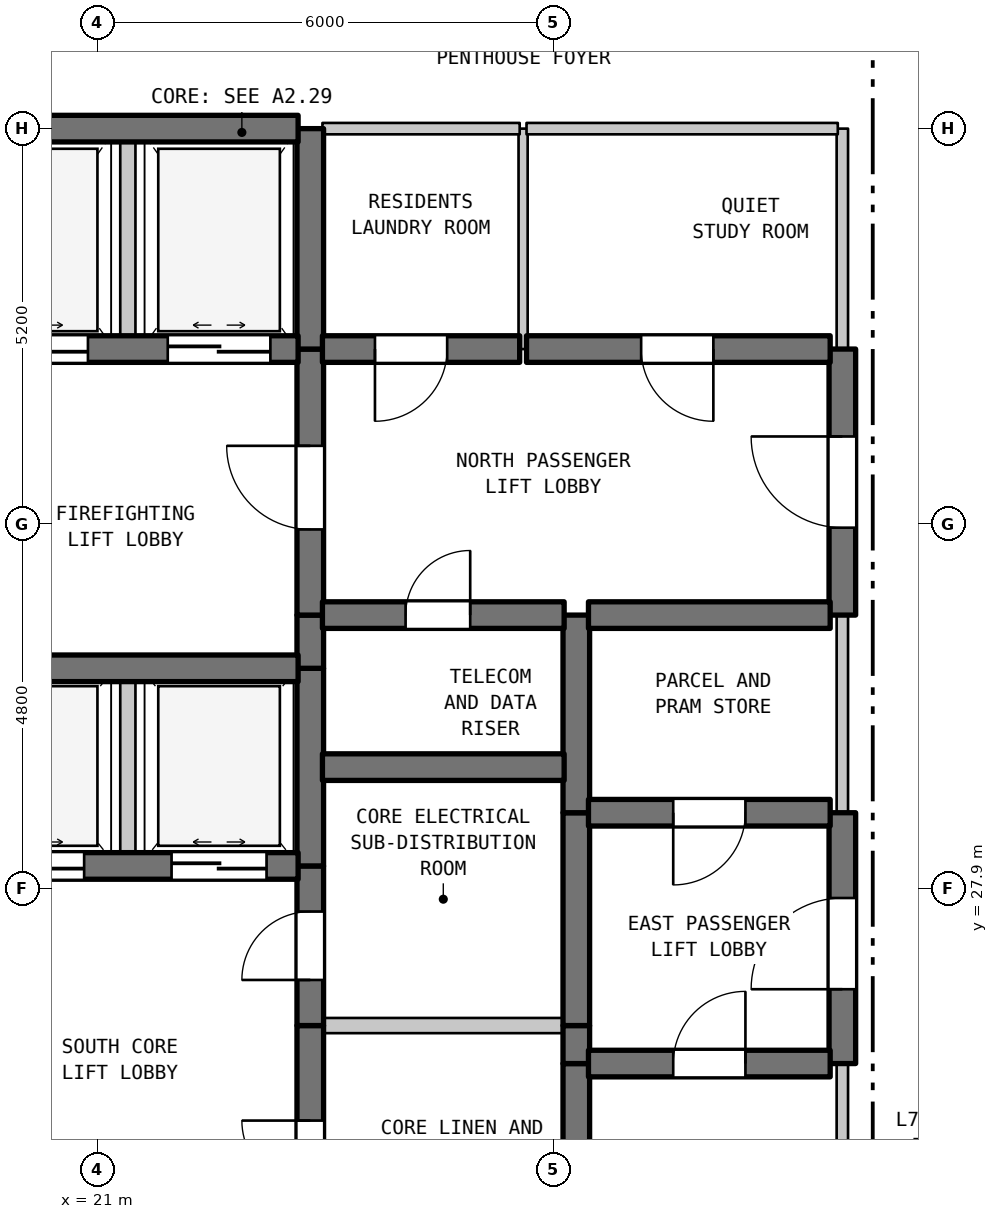
"""IFC4 building model, lengths in metres.
Left out: names, types, materials, properties, quantities, classifications, styles, units other than length and angle.
Written with IfcOpenShell. Run it as: python <this file> out.ifc"""

import sys

from ifc_helpers import new_model, si_unit, direction, frame, frame_2d, origin, place, context, subcontext, project, spatial, rectangle, extrude, element, fill, save


model = new_model("IFC4")
c1 = context("Model", 3, precision=1e-05, world=origin(), true_north=direction((0.0, 1.0)))
c2 = subcontext(c1, "Body", "Model", "MODEL_VIEW")
j1 = project(units=[si_unit("LENGTHUNIT", "METRE"), si_unit("PLANEANGLEUNIT", "RADIAN")], contexts=[c1])
p1 = place(None, origin())
s1 = spatial("IfcSite", under=j1, at=p1, CompositionType="ELEMENT")
p2 = place(p1, origin())
s2 = spatial("IfcBuilding", under=s1, at=p2, CompositionType="ELEMENT")
p3 = place(p2, frame((0.0, 0.0, 284.3)))
s3 = spatial("IfcBuildingStorey", under=s2, at=p3, CompositionType="ELEMENT", Elevation=284.3)
p4 = place(p3, frame((21.4, 28.2, 0.0), z_axis=(0.0, 0.0, 1.0), x_axis=(0.0, 1.0, 0.0)))
e1 = element("IfcWall", 1, at=p4, inside=s3, PredefinedType="STANDARD", context=c2, shape_type="SweptSolid", body=[
    extrude(rectangle(XDim=2.6, YDim=0.2, at=frame_2d((1.3, 0.0))), origin(), (0.0, 0.0, 1.0), 3.39),
])
p5 = place(p3, frame((21.4, 35.0, 0.0), z_axis=(0.0, 0.0, 1.0), x_axis=(0.0, 1.0, 0.0)))
e2 = element("IfcWall", 2, at=p5, inside=s3, PredefinedType="STANDARD", context=c2, shape_type="SweptSolid", body=[
    extrude(rectangle(XDim=2.9, YDim=0.2, at=frame_2d((1.45, 0.0))), origin(), (0.0, 0.0, 1.0), 3.39),
])
p6 = place(p3, frame((23.8, 22.7, 0.0), z_axis=(0.0, 0.0, 1.0), x_axis=(0.0, 1.0, 0.0)))
e3 = element("IfcWall", 3, at=p6, inside=s3, PredefinedType="SHEAR", context=c2, shape_type="SweptSolid", body=[
    extrude(rectangle(XDim=3.4, YDim=0.35, at=frame_2d((1.7, 0.0))), origin(), (0.0, 0.0, 1.0), 3.39),
])
p7 = place(p6, frame((1.25, 0.0, 0.0)))
e4 = element("IfcOpeningElement", 4, at=p7, cuts=e3, PredefinedType="OPENING", context=c2, shape_type="SweptSolid", body=[
    extrude(rectangle(XDim=0.9, YDim=2.15, at=frame_2d((0.45, 1.075))), frame((0.0, 0.185, 0.0), z_axis=(0.0, -1.0, 0.0), x_axis=(1.0, 0.0, 0.0)), (0.0, 0.0, 1.0), 0.37),
])
p8 = place(p3, frame((23.8, 26.1, 0.0), z_axis=(0.0, 0.0, 1.0), x_axis=(0.0, 1.0, 0.0)))
e5 = element("IfcWall", 5, at=p8, inside=s3, PredefinedType="SHEAR", context=c2, shape_type="SweptSolid", body=[
    extrude(rectangle(XDim=2.1, YDim=0.35, at=frame_2d((1.05, 0.0))), origin(), (0.0, 0.0, 1.0), 3.39),
])
p9 = place(p8, frame((0.6, 0.0, 0.0)))
e6 = element("IfcOpeningElement", 6, at=p9, cuts=e5, PredefinedType="OPENING", context=c2, shape_type="SweptSolid", body=[
    extrude(rectangle(XDim=0.9, YDim=2.15, at=frame_2d((0.45, 1.075))), frame((0.0, 0.185, 0.0), z_axis=(0.0, -1.0, 0.0), x_axis=(1.0, 0.0, 0.0)), (0.0, 0.0, 1.0), 0.37),
])
p10 = place(p3, frame((23.8, 28.2, 0.0), z_axis=(0.0, 0.0, 1.0), x_axis=(0.0, 1.0, 0.0)))
e7 = element("IfcWall", 7, at=p10, inside=s3, PredefinedType="SHEAR", context=c2, shape_type="SweptSolid", body=[
    extrude(rectangle(XDim=2.6, YDim=0.35, at=frame_2d((1.3, 0.0))), origin(), (0.0, 0.0, 1.0), 3.39),
])
p11 = place(p3, frame((23.8, 30.8, 0.0), z_axis=(0.0, 0.0, 1.0), x_axis=(0.0, 1.0, 0.0)))
e8 = element("IfcWall", 8, at=p11, inside=s3, PredefinedType="SHEAR", context=c2, shape_type="SweptSolid", body=[
    extrude(rectangle(XDim=0.7, YDim=0.35, at=frame_2d((0.35, 0.0))), origin(), (0.0, 0.0, 1.0), 3.39),
])
p12 = place(p3, frame((23.8, 31.5, 0.0), z_axis=(0.0, 0.0, 1.0), x_axis=(0.0, 1.0, 0.0)))
e9 = element("IfcWall", 9, at=p12, inside=s3, PredefinedType="SHEAR", context=c2, shape_type="SweptSolid", body=[
    extrude(rectangle(XDim=3.5, YDim=0.35, at=frame_2d((1.75, 0.0))), origin(), (0.0, 0.0, 1.0), 3.39),
])
p13 = place(p12, frame((1.127, 0.0, 0.0)))
e10 = element("IfcOpeningElement", 10, at=p13, cuts=e9, PredefinedType="OPENING", context=c2, shape_type="SweptSolid", body=[
    extrude(rectangle(XDim=1.1, YDim=2.15, at=frame_2d((0.55, 1.075))), frame((0.0, 0.185, 0.0), z_axis=(0.0, -1.0, 0.0), x_axis=(1.0, 0.0, 0.0)), (0.0, 0.0, 1.0), 0.37),
])
p14 = place(p3, frame((23.8, 35.0, 0.0), z_axis=(0.0, 0.0, 1.0), x_axis=(0.0, 1.0, 0.0)))
e11 = element("IfcWall", 11, at=p14, inside=s3, PredefinedType="SHEAR", context=c2, shape_type="SweptSolid", body=[
    extrude(rectangle(XDim=2.9, YDim=0.35, at=frame_2d((1.45, 0.0))), origin(), (0.0, 0.0, 1.0), 3.39),
])
p15 = place(p3, frame((26.6, 35.0, 0.0), z_axis=(0.0, 0.0, 1.0), x_axis=(0.0, 1.0, 0.0)))
e12 = element("IfcWall", 12, at=p15, inside=s3, PredefinedType="PARTITIONING", context=c2, shape_type="SweptSolid", body=[
    extrude(rectangle(XDim=2.9, YDim=0.12, at=frame_2d((1.45, 0.0))), origin(), (0.0, 0.0, 1.0), 3.39),
])
p16 = place(p3, frame((27.3, 22.7, 0.0), z_axis=(0.0, 0.0, 1.0), x_axis=(0.0, 1.0, 0.0)))
e13 = element("IfcWall", 13, at=p16, inside=s3, PredefinedType="SHEAR", context=c2, shape_type="SweptSolid", body=[
    extrude(rectangle(XDim=2.9, YDim=0.35, at=frame_2d((1.45, 0.0))), origin(), (0.0, 0.0, 1.0), 3.39),
])
p17 = place(p3, frame((27.3, 25.6, 0.0), z_axis=(0.0, 0.0, 1.0), x_axis=(0.0, 1.0, 0.0)))
e14 = element("IfcWall", 14, at=p17, inside=s3, PredefinedType="SHEAR", context=c2, shape_type="SweptSolid", body=[
    extrude(rectangle(XDim=0.5, YDim=0.35, at=frame_2d((0.25, 0.0))), origin(), (0.0, 0.0, 1.0), 3.39),
])
p18 = place(p3, frame((27.3, 26.1, 0.0), z_axis=(0.0, 0.0, 1.0), x_axis=(0.0, 1.0, 0.0)))
e15 = element("IfcWall", 15, at=p18, inside=s3, PredefinedType="SHEAR", context=c2, shape_type="SweptSolid", body=[
    extrude(rectangle(XDim=2.8, YDim=0.35, at=frame_2d((1.4, 0.0))), origin(), (0.0, 0.0, 1.0), 3.39),
])
p19 = place(p3, frame((27.3, 28.9, 0.0), z_axis=(0.0, 0.0, 1.0), x_axis=(0.0, 1.0, 0.0)))
e16 = element("IfcWall", 16, at=p19, inside=s3, PredefinedType="SHEAR", context=c2, shape_type="SweptSolid", body=[
    extrude(rectangle(XDim=2.6, YDim=0.35, at=frame_2d((1.3, 0.0))), origin(), (0.0, 0.0, 1.0), 3.39),
])
p20 = place(p3, frame((30.8, 22.7, 0.0), z_axis=(0.0, 0.0, 1.0), x_axis=(0.0, 1.0, 0.0)))
e17 = element("IfcWall", 17, at=p20, inside=s3, PredefinedType="STANDARD", context=c2, shape_type="SweptSolid", body=[
    extrude(rectangle(XDim=2.9, YDim=0.15, at=frame_2d((1.45, 0.0))), origin(), (0.0, 0.0, 1.0), 3.39),
])
p21 = place(p3, frame((30.8, 25.6, 0.0), z_axis=(0.0, 0.0, 1.0), x_axis=(0.0, 1.0, 0.0)))
e18 = element("IfcWall", 18, at=p21, inside=s3, PredefinedType="SHEAR", context=c2, shape_type="SweptSolid", body=[
    extrude(rectangle(XDim=3.3, YDim=0.35, at=frame_2d((1.65, 0.0))), origin(), (0.0, 0.0, 1.0), 3.39),
])
p22 = place(p21, frame((0.978, 0.0, 0.0)))
e19 = element("IfcOpeningElement", 19, at=p22, cuts=e18, PredefinedType="OPENING", context=c2, shape_type="SweptSolid", body=[
    extrude(rectangle(XDim=1.2, YDim=2.2, at=frame_2d((0.6, 1.1))), frame((0.0, 0.185, 0.0), z_axis=(0.0, -1.0, 0.0), x_axis=(1.0, 0.0, 0.0)), (0.0, 0.0, 1.0), 0.37),
])
p23 = place(p3, frame((30.8, 28.9, 0.0), z_axis=(0.0, 0.0, 1.0), x_axis=(0.0, 1.0, 0.0)))
e20 = element("IfcWall", 20, at=p23, inside=s3, PredefinedType="STANDARD", context=c2, shape_type="SweptSolid", body=[
    extrude(rectangle(XDim=2.6, YDim=0.15, at=frame_2d((1.3, 0.0))), origin(), (0.0, 0.0, 1.0), 3.39),
])
p24 = place(p3, frame((30.8, 31.5, 0.0), z_axis=(0.0, 0.0, 1.0), x_axis=(0.0, 1.0, 0.0)))
e21 = element("IfcWall", 21, at=p24, inside=s3, PredefinedType="SHEAR", context=c2, shape_type="SweptSolid", body=[
    extrude(rectangle(XDim=3.5, YDim=0.35, at=frame_2d((1.75, 0.0))), origin(), (0.0, 0.0, 1.0), 3.39),
])
p25 = place(p24, frame((1.15, 0.0, 0.0)))
e22 = element("IfcOpeningElement", 22, at=p25, cuts=e21, PredefinedType="OPENING", context=c2, shape_type="SweptSolid", body=[
    extrude(rectangle(XDim=1.2, YDim=2.2, at=frame_2d((0.6, 1.1))), frame((0.0, 0.185, 0.0), z_axis=(0.0, -1.0, 0.0), x_axis=(1.0, 0.0, 0.0)), (0.0, 0.0, 1.0), 0.37),
])
p26 = place(p3, frame((30.8, 35.0, 0.0), z_axis=(0.0, 0.0, 1.0), x_axis=(0.0, 1.0, 0.0)))
e23 = element("IfcWall", 23, at=p26, inside=s3, PredefinedType="STANDARD", context=c2, shape_type="SweptSolid", body=[
    extrude(rectangle(XDim=2.9, YDim=0.15, at=frame_2d((1.45, 0.0))), origin(), (0.0, 0.0, 1.0), 3.39),
])
p27 = place(p3, frame((27.46, 25.6, 0.0), z_axis=(0.0, 0.0, 1.0), x_axis=(1.0, 0.0, 0.0)))
e24 = element("IfcWall", 24, at=p27, inside=s3, PredefinedType="SHEAR", context=c2, shape_type="SweptSolid", body=[
    extrude(rectangle(XDim=3.18, YDim=0.35, at=frame_2d((1.59, 0.0))), origin(), (0.0, 0.0, 1.0), 3.39),
])
p28 = place(p27, frame((1.115, 0.0, 0.0)))
e25 = element("IfcOpeningElement", 25, at=p28, cuts=e24, PredefinedType="OPENING", context=c2, shape_type="SweptSolid", body=[
    extrude(rectangle(XDim=0.95, YDim=2.15, at=frame_2d((0.475, 1.075))), frame((0.0, 0.185, 0.0), z_axis=(0.0, -1.0, 0.0), x_axis=(1.0, 0.0, 0.0)), (0.0, 0.0, 1.0), 0.37),
])
p29 = place(p3, frame((23.96, 26.1, 0.0), z_axis=(0.0, 0.0, 1.0), x_axis=(1.0, 0.0, 0.0)))
e26 = element("IfcWall", 26, at=p29, inside=s3, PredefinedType="STANDARD", context=c2, shape_type="SweptSolid", body=[
    extrude(rectangle(XDim=3.18, YDim=0.2, at=frame_2d((1.59, 0.0))), origin(), (0.0, 0.0, 1.0), 3.39),
])
p30 = place(p3, frame((19.16, 28.2, 0.0), z_axis=(0.0, 0.0, 1.0), x_axis=(1.0, 0.0, 0.0)))
e27 = element("IfcWall", 27, at=p30, inside=s3, PredefinedType="SHEAR", context=c2, shape_type="SweptSolid", body=[
    extrude(rectangle(XDim=4.48, YDim=0.35, at=frame_2d((2.24, 0.0))), origin(), (0.0, 0.0, 1.0), 3.39),
])
p31 = place(p30, frame((0.415, 0.0, 0.0)))
e28 = element("IfcOpeningElement", 28, at=p31, cuts=e27, PredefinedType="OPENING", context=c2, shape_type="SweptSolid", body=[
    extrude(rectangle(XDim=1.25, YDim=2.2, at=frame_2d((0.625, 1.1))), frame((0.0, 0.185, 0.0), z_axis=(0.0, -1.0, 0.0), x_axis=(1.0, 0.0, 0.0)), (0.0, 0.0, 1.0), 0.37),
])
p32 = place(p30, frame((2.815, 0.0, 0.0)))
e29 = element("IfcOpeningElement", 29, at=p32, cuts=e27, PredefinedType="OPENING", context=c2, shape_type="SweptSolid", body=[
    extrude(rectangle(XDim=1.25, YDim=2.2, at=frame_2d((0.625, 1.1))), frame((0.0, 0.185, 0.0), z_axis=(0.0, -1.0, 0.0), x_axis=(1.0, 0.0, 0.0)), (0.0, 0.0, 1.0), 0.37),
])
p33 = place(p3, frame((27.46, 28.9, 0.0), z_axis=(0.0, 0.0, 1.0), x_axis=(1.0, 0.0, 0.0)))
e30 = element("IfcWall", 30, at=p33, inside=s3, PredefinedType="SHEAR", context=c2, shape_type="SweptSolid", body=[
    extrude(rectangle(XDim=3.18, YDim=0.35, at=frame_2d((1.59, 0.0))), origin(), (0.0, 0.0, 1.0), 3.39),
])
p34 = place(p33, frame((1.115, 0.0, 0.0)))
e31 = element("IfcOpeningElement", 31, at=p34, cuts=e30, PredefinedType="OPENING", context=c2, shape_type="SweptSolid", body=[
    extrude(rectangle(XDim=0.95, YDim=2.15, at=frame_2d((0.475, 1.075))), frame((0.0, 0.185, 0.0), z_axis=(0.0, -1.0, 0.0), x_axis=(1.0, 0.0, 0.0)), (0.0, 0.0, 1.0), 0.37),
])
p35 = place(p3, frame((23.96, 29.5, 0.0), z_axis=(0.0, 0.0, 1.0), x_axis=(1.0, 0.0, 0.0)))
e32 = element("IfcWall", 32, at=p35, inside=s3, PredefinedType="SHEAR", context=c2, shape_type="SweptSolid", body=[
    extrude(rectangle(XDim=3.18, YDim=0.35, at=frame_2d((1.59, 0.0))), origin(), (0.0, 0.0, 1.0), 3.39),
])
p36 = place(p3, frame((19.16, 30.8, 0.0), z_axis=(0.0, 0.0, 1.0), x_axis=(1.0, 0.0, 0.0)))
e33 = element("IfcWall", 33, at=p36, inside=s3, PredefinedType="SHEAR", context=c2, shape_type="SweptSolid", body=[
    extrude(rectangle(XDim=4.48, YDim=0.35, at=frame_2d((2.24, 0.0))), origin(), (0.0, 0.0, 1.0), 3.39),
])
p37 = place(p3, frame((23.96, 31.5, 0.0), z_axis=(0.0, 0.0, 1.0), x_axis=(1.0, 0.0, 0.0)))
e34 = element("IfcWall", 34, at=p37, inside=s3, PredefinedType="SHEAR", context=c2, shape_type="SweptSolid", body=[
    extrude(rectangle(XDim=3.18, YDim=0.35, at=frame_2d((1.59, 0.0))), origin(), (0.0, 0.0, 1.0), 3.39),
])
p38 = place(p37, frame((1.094, 0.0, 0.0)))
e35 = element("IfcOpeningElement", 35, at=p38, cuts=e34, PredefinedType="OPENING", context=c2, shape_type="SweptSolid", body=[
    extrude(rectangle(XDim=0.85, YDim=2.1, at=frame_2d((0.425, 1.05))), frame((0.0, 0.185, 0.0), z_axis=(0.0, -1.0, 0.0), x_axis=(1.0, 0.0, 0.0)), (0.0, 0.0, 1.0), 0.37),
])
p39 = place(p3, frame((27.46, 31.5, 0.0), z_axis=(0.0, 0.0, 1.0), x_axis=(1.0, 0.0, 0.0)))
e36 = element("IfcWall", 36, at=p39, inside=s3, PredefinedType="SHEAR", context=c2, shape_type="SweptSolid", body=[
    extrude(rectangle(XDim=3.18, YDim=0.35, at=frame_2d((1.59, 0.0))), origin(), (0.0, 0.0, 1.0), 3.39),
])
p40 = place(p3, frame((19.16, 35.0, 0.0), z_axis=(0.0, 0.0, 1.0), x_axis=(1.0, 0.0, 0.0)))
e37 = element("IfcWall", 37, at=p40, inside=s3, PredefinedType="SHEAR", context=c2, shape_type="SweptSolid", body=[
    extrude(rectangle(XDim=4.48, YDim=0.35, at=frame_2d((2.24, 0.0))), origin(), (0.0, 0.0, 1.0), 3.39),
])
p41 = place(p40, frame((0.365, 0.0, 0.0)))
e38 = element("IfcOpeningElement", 38, at=p41, cuts=e37, PredefinedType="OPENING", context=c2, shape_type="SweptSolid", body=[
    extrude(rectangle(XDim=1.35, YDim=2.2, at=frame_2d((0.675, 1.1))), frame((0.0, 0.185, 0.0), z_axis=(0.0, -1.0, 0.0), x_axis=(1.0, 0.0, 0.0)), (0.0, 0.0, 1.0), 0.37),
])
p42 = place(p40, frame((2.765, 0.0, 0.0)))
e39 = element("IfcOpeningElement", 39, at=p42, cuts=e37, PredefinedType="OPENING", context=c2, shape_type="SweptSolid", body=[
    extrude(rectangle(XDim=1.35, YDim=2.2, at=frame_2d((0.675, 1.1))), frame((0.0, 0.185, 0.0), z_axis=(0.0, -1.0, 0.0), x_axis=(1.0, 0.0, 0.0)), (0.0, 0.0, 1.0), 0.37),
])
p43 = place(p3, frame((23.96, 35.0, 0.0), z_axis=(0.0, 0.0, 1.0), x_axis=(1.0, 0.0, 0.0)))
e40 = element("IfcWall", 40, at=p43, inside=s3, PredefinedType="SHEAR", context=c2, shape_type="SweptSolid", body=[
    extrude(rectangle(XDim=2.595, YDim=0.35, at=frame_2d((1.297, 0.0))), origin(), (0.0, 0.0, 1.0), 3.39),
])
p44 = place(p43, frame((0.691, 0.0, 0.0)))
e41 = element("IfcOpeningElement", 41, at=p44, cuts=e40, PredefinedType="OPENING", context=c2, shape_type="SweptSolid", body=[
    extrude(rectangle(XDim=0.95, YDim=2.15, at=frame_2d((0.475, 1.075))), frame((0.0, 0.185, 0.0), z_axis=(0.0, -1.0, 0.0), x_axis=(1.0, 0.0, 0.0)), (0.0, 0.0, 1.0), 0.37),
])
p45 = place(p3, frame((26.645, 35.0, 0.0), z_axis=(0.0, 0.0, 1.0), x_axis=(1.0, 0.0, 0.0)))
e42 = element("IfcWall", 42, at=p45, inside=s3, PredefinedType="SHEAR", context=c2, shape_type="SweptSolid", body=[
    extrude(rectangle(XDim=3.995, YDim=0.35, at=frame_2d((1.998, 0.0))), origin(), (0.0, 0.0, 1.0), 3.39),
])
p46 = place(p45, frame((1.508, 0.0, 0.0)))
e43 = element("IfcOpeningElement", 43, at=p46, cuts=e42, PredefinedType="OPENING", context=c2, shape_type="SweptSolid", body=[
    extrude(rectangle(XDim=0.95, YDim=2.15, at=frame_2d((0.475, 1.075))), frame((0.0, 0.185, 0.0), z_axis=(0.0, -1.0, 0.0), x_axis=(1.0, 0.0, 0.0)), (0.0, 0.0, 1.0), 0.37),
])
p47 = place(p3, frame((19.16, 37.9, 0.0), z_axis=(0.0, 0.0, 1.0), x_axis=(1.0, 0.0, 0.0)))
e44 = element("IfcWall", 44, at=p47, inside=s3, PredefinedType="SHEAR", context=c2, shape_type="SweptSolid", body=[
    extrude(rectangle(XDim=4.48, YDim=0.35, at=frame_2d((2.24, 0.0))), origin(), (0.0, 0.0, 1.0), 3.39),
])
p48 = place(p3, frame((23.96, 37.9, 0.0), z_axis=(0.0, 0.0, 1.0), x_axis=(1.0, 0.0, 0.0)))
e45 = element("IfcWall", 45, at=p48, inside=s3, PredefinedType="STANDARD", context=c2, shape_type="SweptSolid", body=[
    extrude(rectangle(XDim=2.595, YDim=0.15, at=frame_2d((1.297, 0.0))), origin(), (0.0, 0.0, 1.0), 2.89),
])
p49 = place(p3, frame((26.645, 37.9, 0.0), z_axis=(0.0, 0.0, 1.0), x_axis=(1.0, 0.0, 0.0)))
e46 = element("IfcWall", 46, at=p49, inside=s3, PredefinedType="STANDARD", context=c2, shape_type="SweptSolid", body=[
    extrude(rectangle(XDim=4.095, YDim=0.15, at=frame_2d((2.047, 0.0))), origin(), (0.0, 0.0, 1.0), 2.89),
])
p50 = place(p7, origin())
e47 = element("IfcDoor", 47, at=p50, inside=s3, OperationType="SINGLE_SWING_RIGHT", PredefinedType="DOOR", context=c2, shape_type="SweptSolid", body=[
    extrude(rectangle(XDim=0.9, YDim=2.15, at=frame_2d((0.45, 1.075))), frame((0.0, 0.025, 0.0), z_axis=(0.0, -1.0, 0.0), x_axis=(1.0, 0.0, 0.0)), (0.0, 0.0, 1.0), 0.05),
])
fill(e4, e47)
p51 = place(p9, origin())
e48 = element("IfcDoor", 48, at=p51, inside=s3, OperationType="SINGLE_SWING_LEFT", PredefinedType="DOOR", context=c2, shape_type="SweptSolid", body=[
    extrude(rectangle(XDim=0.9, YDim=2.15, at=frame_2d((0.45, 1.075))), frame((0.0, 0.025, 0.0), z_axis=(0.0, -1.0, 0.0), x_axis=(1.0, 0.0, 0.0)), (0.0, 0.0, 1.0), 0.05),
])
fill(e6, e48)
p52 = place(p13, origin())
e49 = element("IfcDoor", 49, at=p52, inside=s3, OperationType="SINGLE_SWING_RIGHT", PredefinedType="DOOR", context=c2, shape_type="SweptSolid", body=[
    extrude(rectangle(XDim=1.1, YDim=2.15, at=frame_2d((0.55, 1.075))), frame((0.0, 0.025, 0.0), z_axis=(0.0, -1.0, 0.0), x_axis=(1.0, 0.0, 0.0)), (0.0, 0.0, 1.0), 0.05),
])
fill(e10, e49)
p53 = place(p22, origin())
e50 = element("IfcDoor", 50, at=p53, inside=s3, OperationType="SINGLE_SWING_LEFT", PredefinedType="DOOR", context=c2, shape_type="SweptSolid", body=[
    extrude(rectangle(XDim=1.2, YDim=2.2, at=frame_2d((0.6, 1.1))), frame((0.0, 0.025, 0.0), z_axis=(0.0, -1.0, 0.0), x_axis=(1.0, 0.0, 0.0)), (0.0, 0.0, 1.0), 0.05),
])
fill(e19, e50)
p54 = place(p25, origin())
e51 = element("IfcDoor", 51, at=p54, inside=s3, OperationType="SINGLE_SWING_RIGHT", PredefinedType="DOOR", context=c2, shape_type="SweptSolid", body=[
    extrude(rectangle(XDim=1.2, YDim=2.2, at=frame_2d((0.6, 1.1))), frame((0.0, 0.025, 0.0), z_axis=(0.0, -1.0, 0.0), x_axis=(1.0, 0.0, 0.0)), (0.0, 0.0, 1.0), 0.05),
])
fill(e22, e51)
p55 = place(p28, origin())
e52 = element("IfcDoor", 52, at=p55, inside=s3, OperationType="SINGLE_SWING_RIGHT", PredefinedType="DOOR", context=c2, shape_type="SweptSolid", body=[
    extrude(rectangle(XDim=0.95, YDim=2.15, at=frame_2d((0.475, 1.075))), frame((0.0, 0.025, 0.0), z_axis=(0.0, -1.0, 0.0), x_axis=(1.0, 0.0, 0.0)), (0.0, 0.0, 1.0), 0.05),
])
fill(e25, e52)
p56 = place(p31, origin())
e53 = element("IfcDoor", 53, at=p56, inside=s3, OperationType="DOUBLE_DOOR_SLIDING", PredefinedType="DOOR", context=c2, shape_type="SweptSolid", body=[
    extrude(rectangle(XDim=1.25, YDim=2.2, at=frame_2d((0.625, 1.1))), frame((0.0, 0.025, 0.0), z_axis=(0.0, -1.0, 0.0), x_axis=(1.0, 0.0, 0.0)), (0.0, 0.0, 1.0), 0.05),
])
fill(e28, e53)
p57 = place(p32, origin())
e54 = element("IfcDoor", 54, at=p57, inside=s3, OperationType="DOUBLE_DOOR_SLIDING", PredefinedType="DOOR", context=c2, shape_type="SweptSolid", body=[
    extrude(rectangle(XDim=1.25, YDim=2.2, at=frame_2d((0.625, 1.1))), frame((0.0, 0.025, 0.0), z_axis=(0.0, -1.0, 0.0), x_axis=(1.0, 0.0, 0.0)), (0.0, 0.0, 1.0), 0.05),
])
fill(e29, e54)
p58 = place(p34, frame((0.95, 0.0, 0.0), z_axis=(0.0, 0.0, 1.0), x_axis=(-1.0, 0.0, 0.0)))
e55 = element("IfcDoor", 55, at=p58, inside=s3, OperationType="SINGLE_SWING_LEFT", PredefinedType="DOOR", context=c2, shape_type="SweptSolid", body=[
    extrude(rectangle(XDim=0.95, YDim=2.15, at=frame_2d((0.475, 1.075))), frame((0.0, 0.025, 0.0), z_axis=(0.0, -1.0, 0.0), x_axis=(1.0, 0.0, 0.0)), (0.0, 0.0, 1.0), 0.05),
])
fill(e31, e55)
p59 = place(p38, origin())
e56 = element("IfcDoor", 56, at=p59, inside=s3, OperationType="SINGLE_SWING_RIGHT", PredefinedType="DOOR", context=c2, shape_type="SweptSolid", body=[
    extrude(rectangle(XDim=0.85, YDim=2.1, at=frame_2d((0.425, 1.05))), frame((0.0, 0.025, 0.0), z_axis=(0.0, -1.0, 0.0), x_axis=(1.0, 0.0, 0.0)), (0.0, 0.0, 1.0), 0.05),
])
fill(e35, e56)
p60 = place(p41, origin())
e57 = element("IfcDoor", 57, at=p60, inside=s3, OperationType="DOUBLE_DOOR_SLIDING", PredefinedType="DOOR", context=c2, shape_type="SweptSolid", body=[
    extrude(rectangle(XDim=1.35, YDim=2.2, at=frame_2d((0.675, 1.1))), frame((0.0, 0.025, 0.0), z_axis=(0.0, -1.0, 0.0), x_axis=(1.0, 0.0, 0.0)), (0.0, 0.0, 1.0), 0.05),
])
fill(e38, e57)
p61 = place(p42, origin())
e58 = element("IfcDoor", 58, at=p61, inside=s3, OperationType="DOUBLE_DOOR_SLIDING", PredefinedType="DOOR", context=c2, shape_type="SweptSolid", body=[
    extrude(rectangle(XDim=1.35, YDim=2.2, at=frame_2d((0.675, 1.1))), frame((0.0, 0.025, 0.0), z_axis=(0.0, -1.0, 0.0), x_axis=(1.0, 0.0, 0.0)), (0.0, 0.0, 1.0), 0.05),
])
fill(e39, e58)
p62 = place(p44, frame((0.95, 0.0, 0.0), z_axis=(0.0, 0.0, 1.0), x_axis=(-1.0, 0.0, 0.0)))
e59 = element("IfcDoor", 59, at=p62, inside=s3, OperationType="SINGLE_SWING_LEFT", PredefinedType="DOOR", context=c2, shape_type="SweptSolid", body=[
    extrude(rectangle(XDim=0.95, YDim=2.15, at=frame_2d((0.475, 1.075))), frame((0.0, 0.025, 0.0), z_axis=(0.0, -1.0, 0.0), x_axis=(1.0, 0.0, 0.0)), (0.0, 0.0, 1.0), 0.05),
])
fill(e41, e59)
p63 = place(p46, frame((0.95, 0.0, 0.0), z_axis=(0.0, 0.0, 1.0), x_axis=(-1.0, 0.0, 0.0)))
e60 = element("IfcDoor", 60, at=p63, inside=s3, OperationType="SINGLE_SWING_RIGHT", PredefinedType="DOOR", context=c2, shape_type="SweptSolid", body=[
    extrude(rectangle(XDim=0.95, YDim=2.15, at=frame_2d((0.475, 1.075))), frame((0.0, 0.025, 0.0), z_axis=(0.0, -1.0, 0.0), x_axis=(1.0, 0.0, 0.0)), (0.0, 0.0, 1.0), 0.05),
])
fill(e43, e60)
save(model, sys.argv[1])
